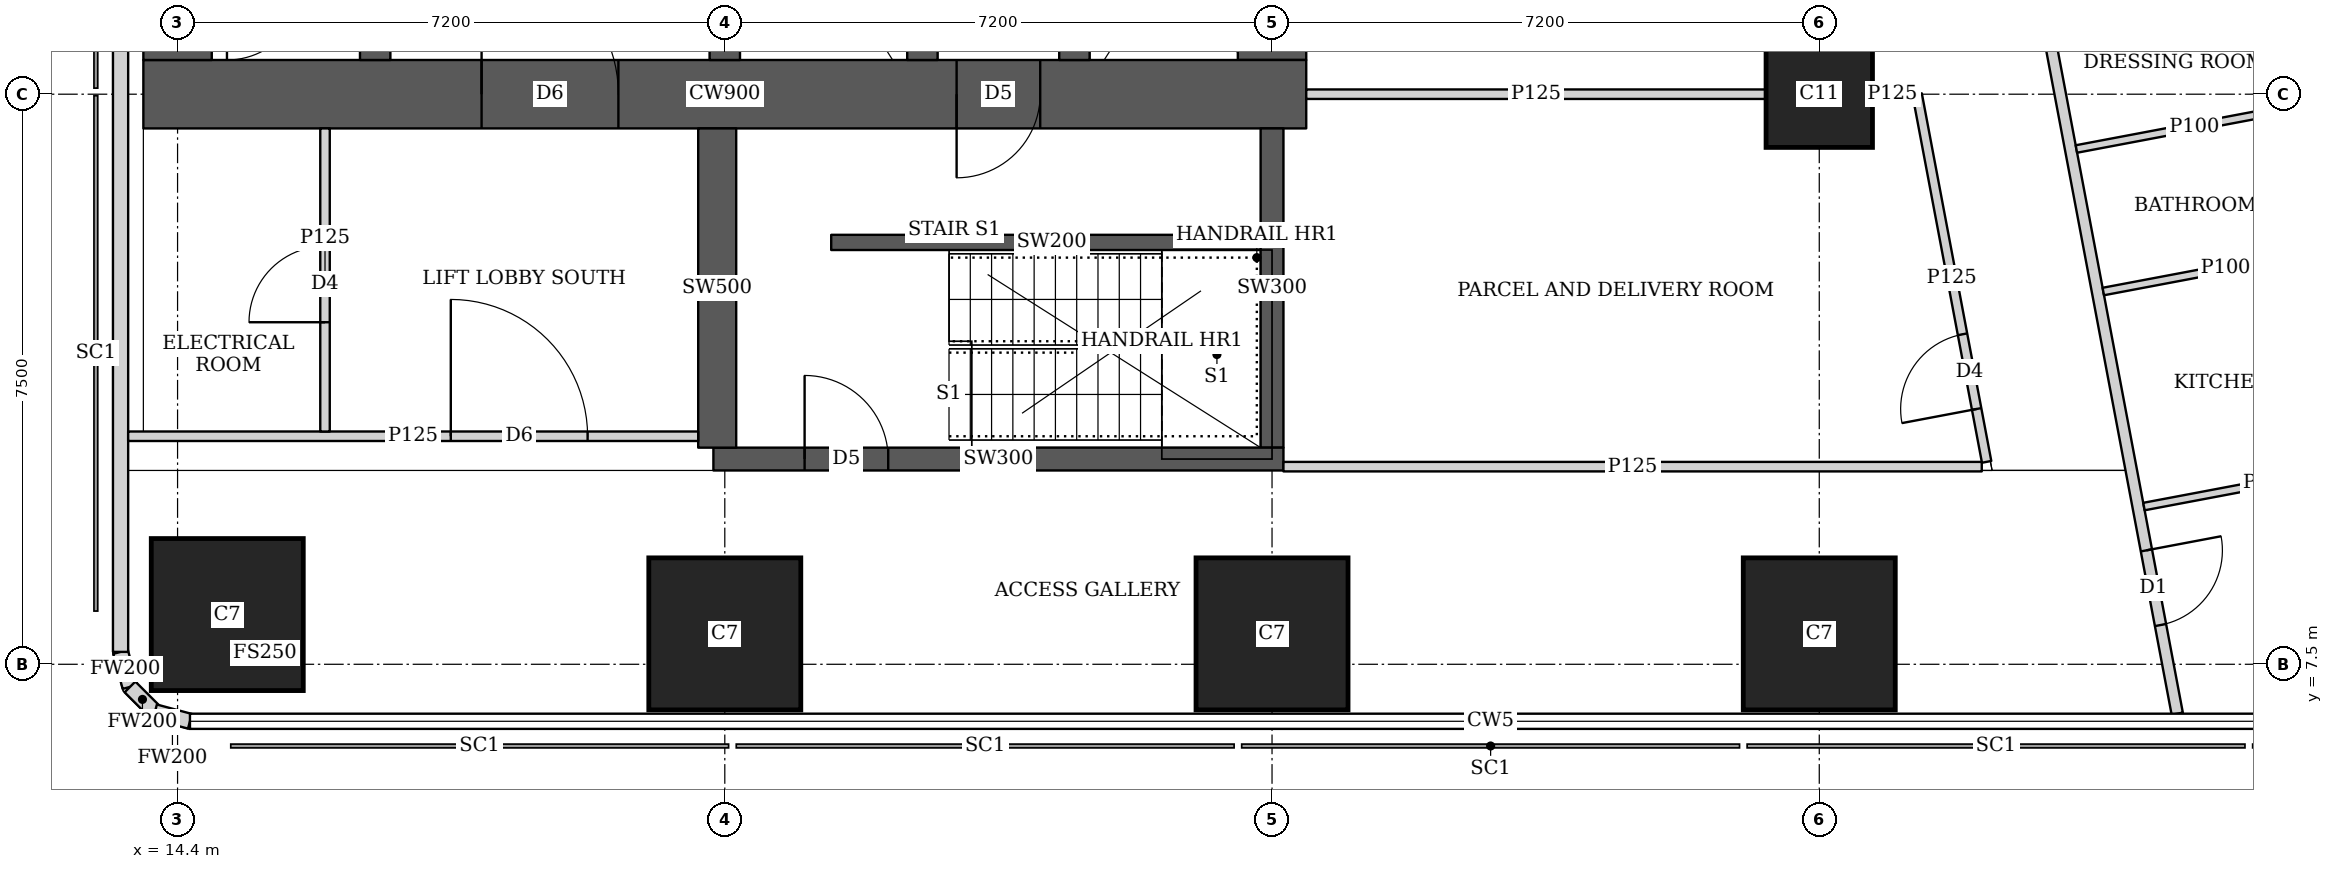
"""IFC4 building model, lengths in metres.
Left out: names, types, materials, properties, quantities, classifications, styles, units other than length and angle.
Written with IfcOpenShell. Run it as: python <this file> out.ifc"""

import sys

from ifc_helpers import new_model, si_unit, direction, frame, frame_2d, origin, origin_2d, place, context, subcontext, project, spatial, rectangle, extrude, element, fill, save


model = new_model("IFC4")
c1 = context("Model", 3, precision=1e-05, world=origin(), true_north=direction((0.0, 1.0)))
c2 = subcontext(c1, "Body", "Model", "MODEL_VIEW")
j1 = project(units=[si_unit("LENGTHUNIT", "METRE"), si_unit("PLANEANGLEUNIT", "RADIAN")], contexts=[c1])
p1 = place(None, origin())
s1 = spatial("IfcSite", under=j1, at=p1, CompositionType="ELEMENT")
p2 = place(p1, origin())
s2 = spatial("IfcBuilding", under=s1, at=p2, CompositionType="ELEMENT")
p3 = place(p2, frame((0.0, 0.0, 292.85)))
s3 = spatial("IfcBuildingStorey", under=s2, at=p3, CompositionType="ELEMENT", Elevation=292.85)
for number, where, z_axis, x_axis in (
    (1, (15.054, 8.154, 0.0), (0.0, 0.0, 1.0), (1.0, 0.0, 0.0)),
    (2, (21.6, 7.9, 0.0), (0.0, 0.0, 1.0), (1.0, 0.0, 0.0)),
    (3, (28.8, 7.9, 0.0), (0.0, 0.0, 1.0), (1.0, 0.0, 0.0)),
    (4, (36.0, 7.9, 0.0), (0.0, 0.0, 1.0), (1.0, 0.0, 0.0)),
):
    element("IfcColumn", number, at=place(p3, frame(where, z_axis=z_axis, x_axis=x_axis)), inside=s3, PredefinedType="COLUMN", context=c2, shape_type="SweptSolid", body=[
        extrude(rectangle(XDim=2.0, YDim=2.0, at=origin_2d()), origin(), (0.0, 0.0, 1.0), 3.75),
    ])
p4 = place(p3, frame((36.0, 15.0, 0.0), z_axis=(0.0, 0.0, 1.0), x_axis=(1.0, 0.0, 0.0)))
e5 = element("IfcColumn", 5, at=p4, inside=s3, PredefinedType="COLUMN", context=c2, shape_type="SweptSolid", body=[
    extrude(rectangle(XDim=1.4, YDim=1.4, at=origin_2d()), origin(), (0.0, 0.0, 1.0), 3.75),
])
p5 = place(p3, frame((13.95, 15.0, 0.0), z_axis=(0.0, 0.0, 1.0), x_axis=(1.0, 0.0, 0.0)))
e6 = element("IfcWall", 6, at=p5, inside=s3, PredefinedType="SHEAR", context=c2, shape_type="SweptSolid", body=[
    extrude(rectangle(XDim=15.3, YDim=0.9, at=frame_2d((7.65, 0.0))), origin(), (0.0, 0.0, 1.0), 3.75),
])
p6 = place(p5, frame((4.45, 0.0, 0.0)))
e7 = element("IfcOpeningElement", 7, at=p6, cuts=e6, PredefinedType="OPENING", context=c2, shape_type="SweptSolid", body=[
    extrude(rectangle(XDim=1.8, YDim=2.1, at=frame_2d((0.9, 1.05))), frame((0.0, 0.46, 0.0), z_axis=(0.0, -1.0, 0.0), x_axis=(1.0, 0.0, 0.0)), (0.0, 0.0, 1.0), 0.92),
])
p7 = place(p5, frame((10.7, 0.0, 0.0)))
e8 = element("IfcOpeningElement", 8, at=p7, cuts=e6, PredefinedType="OPENING", context=c2, shape_type="SweptSolid", body=[
    extrude(rectangle(XDim=1.1, YDim=2.1, at=frame_2d((0.55, 1.05))), frame((0.0, 0.46, 0.0), z_axis=(0.0, -1.0, 0.0), x_axis=(1.0, 0.0, 0.0)), (0.0, 0.0, 1.0), 0.92),
])
for number, where, z_axis, x_axis in (
    (9, (14.4, 15.45, 0.0), (0.0, 0.0, 1.0), (0.0, 1.0, 0.0)),
    (10, (28.8, 15.45, 0.0), (0.0, 0.0, 1.0), (0.0, 1.0, 0.0)),
):
    element("IfcWall", number, at=place(p3, frame(where, z_axis=z_axis, x_axis=x_axis)), inside=s3, PredefinedType="SHEAR", context=c2, shape_type="SweptSolid", body=[
        extrude(rectangle(XDim=14.1, YDim=0.9, at=frame_2d((7.05, 0.0))), origin(), (0.0, 0.0, 1.0), 3.75),
    ])
p8 = place(p3, frame((17.0, 15.45, 0.0), z_axis=(0.0, 0.0, 1.0), x_axis=(0.0, 1.0, 0.0)))
e11 = element("IfcWall", 11, at=p8, inside=s3, PredefinedType="SHEAR", context=c2, shape_type="SweptSolid", body=[
    extrude(rectangle(XDim=14.1, YDim=0.4, at=frame_2d((7.05, 0.0))), origin(), (0.0, 0.0, 1.0), 3.75),
])
p9 = place(p8, frame((1.05, 0.0, 0.0)))
e12 = element("IfcOpeningElement", 12, at=p9, cuts=e11, PredefinedType="OPENING", context=c2, shape_type="SweptSolid", body=[
    extrude(rectangle(XDim=1.0, YDim=2.1, at=frame_2d((0.5, 1.05))), frame((0.0, 0.21, 0.0), z_axis=(0.0, -1.0, 0.0), x_axis=(1.0, 0.0, 0.0)), (0.0, 0.0, 1.0), 0.42),
])
p10 = place(p8, frame((4.675, 0.0, 0.0)))
e13 = element("IfcOpeningElement", 13, at=p10, cuts=e11, PredefinedType="OPENING", context=c2, shape_type="SweptSolid", body=[
    extrude(rectangle(XDim=1.0, YDim=2.1, at=frame_2d((0.5, 1.05))), frame((0.0, 0.21, 0.0), z_axis=(0.0, -1.0, 0.0), x_axis=(1.0, 0.0, 0.0)), (0.0, 0.0, 1.0), 0.42),
])
p11 = place(p8, frame((8.425, 0.0, 0.0)))
e14 = element("IfcOpeningElement", 14, at=p11, cuts=e11, PredefinedType="OPENING", context=c2, shape_type="SweptSolid", body=[
    extrude(rectangle(XDim=1.0, YDim=2.1, at=frame_2d((0.5, 1.05))), frame((0.0, 0.21, 0.0), z_axis=(0.0, -1.0, 0.0), x_axis=(1.0, 0.0, 0.0)), (0.0, 0.0, 1.0), 0.42),
])
p12 = place(p8, frame((12.175, 0.0, 0.0)))
e15 = element("IfcOpeningElement", 15, at=p12, cuts=e11, PredefinedType="OPENING", context=c2, shape_type="SweptSolid", body=[
    extrude(rectangle(XDim=1.0, YDim=2.1, at=frame_2d((0.5, 1.05))), frame((0.0, 0.21, 0.0), z_axis=(0.0, -1.0, 0.0), x_axis=(1.0, 0.0, 0.0)), (0.0, 0.0, 1.0), 0.42),
])
p13 = place(p3, frame((21.6, 15.45, 0.0), z_axis=(0.0, 0.0, 1.0), x_axis=(0.0, 1.0, 0.0)))
e16 = element("IfcWall", 16, at=p13, inside=s3, PredefinedType="SHEAR", context=c2, shape_type="SweptSolid", body=[
    extrude(rectangle(XDim=14.1, YDim=0.4, at=frame_2d((7.05, 0.0))), origin(), (0.0, 0.0, 1.0), 3.75),
])
p14 = place(p13, frame((0.875, 0.0, 0.0)))
e17 = element("IfcOpeningElement", 17, at=p14, cuts=e16, PredefinedType="OPENING", context=c2, shape_type="SweptSolid", body=[
    extrude(rectangle(XDim=1.1, YDim=2.1, at=frame_2d((0.55, 1.05))), frame((0.0, 0.21, 0.0), z_axis=(0.0, -1.0, 0.0), x_axis=(1.0, 0.0, 0.0)), (0.0, 0.0, 1.0), 0.42),
])
p15 = place(p13, frame((4.625, 0.0, 0.0)))
e18 = element("IfcOpeningElement", 18, at=p15, cuts=e16, PredefinedType="OPENING", context=c2, shape_type="SweptSolid", body=[
    extrude(rectangle(XDim=1.1, YDim=2.1, at=frame_2d((0.55, 1.05))), frame((0.0, 0.21, 0.0), z_axis=(0.0, -1.0, 0.0), x_axis=(1.0, 0.0, 0.0)), (0.0, 0.0, 1.0), 0.42),
])
p16 = place(p13, frame((8.375, 0.0, 0.0)))
e19 = element("IfcOpeningElement", 19, at=p16, cuts=e16, PredefinedType="OPENING", context=c2, shape_type="SweptSolid", body=[
    extrude(rectangle(XDim=1.1, YDim=2.1, at=frame_2d((0.55, 1.05))), frame((0.0, 0.21, 0.0), z_axis=(0.0, -1.0, 0.0), x_axis=(1.0, 0.0, 0.0)), (0.0, 0.0, 1.0), 0.42),
])
p17 = place(p13, frame((12.125, 0.0, 0.0)))
e20 = element("IfcOpeningElement", 20, at=p17, cuts=e16, PredefinedType="OPENING", context=c2, shape_type="SweptSolid", body=[
    extrude(rectangle(XDim=1.1, YDim=2.1, at=frame_2d((0.55, 1.05))), frame((0.0, 0.21, 0.0), z_axis=(0.0, -1.0, 0.0), x_axis=(1.0, 0.0, 0.0)), (0.0, 0.0, 1.0), 0.42),
])
p18 = place(p3, frame((24.2, 15.45, 0.0), z_axis=(0.0, 0.0, 1.0), x_axis=(0.0, 1.0, 0.0)))
e21 = element("IfcWall", 21, at=p18, inside=s3, PredefinedType="SHEAR", context=c2, shape_type="SweptSolid", body=[
    extrude(rectangle(XDim=14.1, YDim=0.4, at=frame_2d((7.05, 0.0))), origin(), (0.0, 0.0, 1.0), 3.75),
])
p19 = place(p3, frame((26.2, 15.45, 0.0), z_axis=(0.0, 0.0, 1.0), x_axis=(0.0, 1.0, 0.0)))
e22 = element("IfcWall", 22, at=p19, inside=s3, PredefinedType="SHEAR", context=c2, shape_type="SweptSolid", body=[
    extrude(rectangle(XDim=3.1, YDim=0.4, at=frame_2d((1.55, 0.0))), origin(), (0.0, 0.0, 1.0), 3.75),
])
p20 = place(p19, frame((0.825, 0.0, 0.0)))
e23 = element("IfcOpeningElement", 23, at=p20, cuts=e22, PredefinedType="OPENING", context=c2, shape_type="SweptSolid", body=[
    extrude(rectangle(XDim=1.2, YDim=2.1, at=frame_2d((0.6, 1.05))), frame((0.0, 0.21, 0.0), z_axis=(0.0, -1.0, 0.0), x_axis=(1.0, 0.0, 0.0)), (0.0, 0.0, 1.0), 0.42),
])
p21 = place(p3, frame((21.45, 10.2, 0.0), z_axis=(0.0, 0.0, 1.0), x_axis=(1.0, 0.0, 0.0)))
e24 = element("IfcWall", 24, at=p21, inside=s3, PredefinedType="SHEAR", context=c2, shape_type="SweptSolid", body=[
    extrude(rectangle(XDim=7.5, YDim=0.3, at=frame_2d((3.75, 0.0))), origin(), (0.0, 0.0, 1.0), 3.75),
])
p22 = place(p21, frame((1.2, 0.0, 0.0)))
e25 = element("IfcOpeningElement", 25, at=p22, cuts=e24, PredefinedType="OPENING", context=c2, shape_type="SweptSolid", body=[
    extrude(rectangle(XDim=1.1, YDim=2.1, at=frame_2d((0.55, 1.05))), frame((0.0, 0.16, 0.0), z_axis=(0.0, -1.0, 0.0), x_axis=(1.0, 0.0, 0.0)), (0.0, 0.0, 1.0), 0.32),
])
p23 = place(p3, frame((21.5, 10.35, 0.0), z_axis=(0.0, 0.0, 1.0), x_axis=(0.0, 1.0, 0.0)))
e26 = element("IfcWall", 26, at=p23, inside=s3, PredefinedType="SHEAR", context=c2, shape_type="SweptSolid", body=[
    extrude(rectangle(XDim=4.2, YDim=0.5, at=frame_2d((2.1, 0.0))), origin(), (0.0, 0.0, 1.0), 3.75),
])
p24 = place(p3, frame((28.8, 10.35, 0.0), z_axis=(0.0, 0.0, 1.0), x_axis=(0.0, 1.0, 0.0)))
e27 = element("IfcWall", 27, at=p24, inside=s3, PredefinedType="SHEAR", context=c2, shape_type="SweptSolid", body=[
    extrude(rectangle(XDim=4.2, YDim=0.3, at=frame_2d((2.1, 0.0))), origin(), (0.0, 0.0, 1.0), 3.75),
])
p25 = place(p3, frame((13.65, 43.037, 0.0), z_axis=(0.0, 0.0, 1.0), x_axis=(0.0, -1.0, 0.0)))
e28 = element("IfcWall", 28, at=p25, inside=s3, PredefinedType="SOLIDWALL", context=c2, shape_type="SweptSolid", body=[
    extrude(rectangle(XDim=35.374, YDim=0.2, at=frame_2d((17.687, 0.0))), origin(), (0.0, 0.0, 1.0), 3.4),
])
p26 = place(p3, frame((13.65, 7.663, 0.0), z_axis=(0.0, 0.0, 1.0), x_axis=(0.259698463175, -0.965689757751, 0.0)))
e29 = element("IfcWall", 29, at=p26, inside=s3, PredefinedType="SOLIDWALL", context=c2, shape_type="SweptSolid", body=[
    extrude(rectangle(XDim=0.478, YDim=0.2, at=frame_2d((0.239, 0.0))), origin(), (0.0, 0.0, 1.0), 3.4),
])
p27 = place(p3, frame((13.774, 7.202, 0.0), z_axis=(0.0, 0.0, 1.0), x_axis=(0.707369890659, -0.706843573776, 0.0)))
e30 = element("IfcWall", 30, at=p27, inside=s3, PredefinedType="SOLIDWALL", context=c2, shape_type="SweptSolid", body=[
    extrude(rectangle(XDim=0.464, YDim=0.2, at=frame_2d((0.232, 0.0))), origin(), (0.0, 0.0, 1.0), 3.4),
])
p28 = place(p3, frame((14.102, 6.874, 0.0), z_axis=(0.0, 0.0, 1.0), x_axis=(0.965655254015, -0.259826731483, 0.0)))
e31 = element("IfcWall", 31, at=p28, inside=s3, PredefinedType="SOLIDWALL", context=c2, shape_type="SweptSolid", body=[
    extrude(rectangle(XDim=0.477, YDim=0.2, at=frame_2d((0.239, 0.0))), origin(), (0.0, 0.0, 1.0), 3.4),
])
p29 = place(p3, frame((34.036, 42.186, 0.0), z_axis=(0.0, 0.0, 1.0), x_axis=(0.185593518645, -0.9826266055, 0.0)))
e32 = element("IfcWall", 32, at=p29, inside=s3, PredefinedType="SOLIDWALL", context=c2, shape_type="SweptSolid", body=[
    extrude(rectangle(XDim=35.961, YDim=0.15, at=frame_2d((17.98, 0.0))), origin(), (0.0, 0.0, 1.0), 2.4),
])
p30 = place(p29, frame((19.345, 0.0, 0.0)))
e33 = element("IfcOpeningElement", 33, at=p30, cuts=e32, PredefinedType="OPENING", context=c2, shape_type="SweptSolid", body=[
    extrude(rectangle(XDim=1.0, YDim=2.1, at=frame_2d((0.5, 1.05))), frame((0.0, 0.085, 0.0), z_axis=(0.0, -1.0, 0.0), x_axis=(1.0, 0.0, 0.0)), (0.0, 0.0, 1.0), 0.17),
])
p31 = place(p29, frame((33.774, 0.0, 0.0)))
e34 = element("IfcOpeningElement", 34, at=p31, cuts=e32, PredefinedType="OPENING", context=c2, shape_type="SweptSolid", body=[
    extrude(rectangle(XDim=1.0, YDim=2.1, at=frame_2d((0.5, 1.05))), frame((0.0, 0.085, 0.0), z_axis=(0.0, -1.0, 0.0), x_axis=(1.0, 0.0, 0.0)), (0.0, 0.0, 1.0), 0.17),
])
p32 = place(p3, frame((42.49, 14.866, 0.0), z_axis=(0.0, 0.0, 1.0), x_axis=(-0.982621285075, -0.185621685472, 0.0)))
e35 = element("IfcWall", 35, at=p32, inside=s3, PredefinedType="PARTITIONING", context=c2, shape_type="SweptSolid", body=[
    extrude(rectangle(XDim=3.162, YDim=0.1, at=frame_2d((1.581, 0.0))), origin(), (0.0, 0.0, 1.0), 2.5),
])
p33 = place(p3, frame((42.956, 13.012, 0.0), z_axis=(0.0, 0.0, 1.0), x_axis=(-0.982630897129, -0.185570795135, 0.0)))
e36 = element("IfcWall", 36, at=p33, inside=s3, PredefinedType="PARTITIONING", context=c2, shape_type="SweptSolid", body=[
    extrude(rectangle(XDim=3.276, YDim=0.1, at=frame_2d((1.638, 0.0))), origin(), (0.0, 0.0, 1.0), 2.5),
])
p34 = place(p3, frame((43.539, 10.192, 0.0), z_axis=(0.0, 0.0, 1.0), x_axis=(-0.982633623707, -0.185556356831, 0.0)))
e37 = element("IfcWall", 37, at=p34, inside=s3, PredefinedType="PARTITIONING", context=c2, shape_type="SweptSolid", body=[
    extrude(rectangle(XDim=3.325, YDim=0.1, at=frame_2d((1.663, 0.0))), origin(), (0.0, 0.0, 1.0), 2.5),
])
p35 = place(p3, frame((13.75, 10.5, 0.0), z_axis=(0.0, 0.0, 1.0), x_axis=(1.0, 0.0, 0.0)))
e38 = element("IfcWall", 38, at=p35, inside=s3, PredefinedType="PARTITIONING", context=c2, shape_type="SweptSolid", body=[
    extrude(rectangle(XDim=7.5, YDim=0.125, at=frame_2d((3.75, 0.0))), origin(), (0.0, 0.0, 1.0), 3.4),
])
p36 = place(p35, frame((4.245, 0.0, 0.0)))
e39 = element("IfcOpeningElement", 39, at=p36, cuts=e38, PredefinedType="OPENING", context=c2, shape_type="SweptSolid", body=[
    extrude(rectangle(XDim=1.8, YDim=2.1, at=frame_2d((0.9, 1.05))), frame((0.0, 0.073, 0.0), z_axis=(0.0, -1.0, 0.0), x_axis=(1.0, 0.0, 0.0)), (0.0, 0.0, 1.0), 0.145),
])
p37 = place(p3, frame((16.34, 10.562, 0.0), z_axis=(0.0, 0.0, 1.0), x_axis=(0.0, 1.0, 0.0)))
e40 = element("IfcWall", 40, at=p37, inside=s3, PredefinedType="PARTITIONING", context=c2, shape_type="SweptSolid", body=[
    extrude(rectangle(XDim=3.988, YDim=0.125, at=frame_2d((1.994, 0.0))), origin(), (0.0, 0.0, 1.0), 3.4),
])
p38 = place(p37, frame((1.438, 0.0, 0.0)))
e41 = element("IfcOpeningElement", 41, at=p38, cuts=e40, PredefinedType="OPENING", context=c2, shape_type="SweptSolid", body=[
    extrude(rectangle(XDim=1.0, YDim=2.1, at=frame_2d((0.5, 1.05))), frame((0.0, 0.073, 0.0), z_axis=(0.0, -1.0, 0.0), x_axis=(1.0, 0.0, 0.0)), (0.0, 0.0, 1.0), 0.145),
])
p39 = place(p3, frame((28.95, 10.1, 0.0), z_axis=(0.0, 0.0, 1.0), x_axis=(1.0, 0.0, 0.0)))
e42 = element("IfcWall", 42, at=p39, inside=s3, PredefinedType="PARTITIONING", context=c2, shape_type="SweptSolid", body=[
    extrude(rectangle(XDim=9.188, YDim=0.125, at=frame_2d((4.594, 0.0))), origin(), (0.0, 0.0, 1.0), 2.5),
])
p40 = place(p3, frame((38.202, 10.163, 0.0), z_axis=(0.0, 0.0, 1.0), x_axis=(-0.185641892853, 0.982617467593, 0.0)))
e43 = element("IfcWall", 43, at=p40, inside=s3, PredefinedType="PARTITIONING", context=c2, shape_type="SweptSolid", body=[
    extrude(rectangle(XDim=4.922, YDim=0.125, at=frame_2d((2.461, 0.0))), origin(), (0.0, 0.0, 1.0), 2.5),
])
p41 = place(p40, frame((0.708, 0.0, 0.0)))
e44 = element("IfcOpeningElement", 44, at=p41, cuts=e43, PredefinedType="OPENING", context=c2, shape_type="SweptSolid", body=[
    extrude(rectangle(XDim=1.0, YDim=2.1, at=frame_2d((0.5, 1.05))), frame((0.0, 0.073, 0.0), z_axis=(0.0, -1.0, 0.0), x_axis=(1.0, 0.0, 0.0)), (0.0, 0.0, 1.0), 0.145),
])
p42 = place(p3, frame((29.25, 15.0, 0.0), z_axis=(0.0, 0.0, 1.0), x_axis=(1.0, 0.0, 0.0)))
e45 = element("IfcWall", 45, at=p42, inside=s3, PredefinedType="PARTITIONING", context=c2, shape_type="SweptSolid", body=[
    extrude(rectangle(XDim=6.049, YDim=0.125, at=frame_2d((3.024, 0.0))), origin(), (0.0, 0.0, 1.0), 2.5),
])
p43 = place(p3, frame((36.701, 15.0, 0.0), z_axis=(0.0, 0.0, 1.0), x_axis=(1.0, 0.0, 0.0)))
e46 = element("IfcWall", 46, at=p43, inside=s3, PredefinedType="PARTITIONING", context=c2, shape_type="SweptSolid", body=[
    extrude(rectangle(XDim=0.526, YDim=0.125, at=frame_2d((0.263, 0.0))), origin(), (0.0, 0.0, 1.0), 2.5),
])
p44 = place(p3, frame((23.0, 13.05, 0.0), z_axis=(0.0, 0.0, 1.0), x_axis=(1.0, 0.0, 0.0)))
e47 = element("IfcWall", 47, at=p44, inside=s3, PredefinedType="SHEAR", context=c2, shape_type="SweptSolid", body=[
    extrude(rectangle(XDim=5.8, YDim=0.2, at=frame_2d((2.9, 0.0))), origin(), (0.0, 0.0, 1.0), 3.75),
])
p45 = place(p31, origin())
e48 = element("IfcDoor", 48, at=p45, inside=s3, OperationType="SINGLE_SWING_LEFT", PredefinedType="DOOR", context=c2, shape_type="SweptSolid", body=[
    extrude(rectangle(XDim=1.0, YDim=2.1, at=frame_2d((0.5, 1.05))), frame((0.0, 0.025, 0.0), z_axis=(0.0, -1.0, 0.0), x_axis=(1.0, 0.0, 0.0)), (0.0, 0.0, 1.0), 0.05),
])
fill(e34, e48)
p46 = place(p38, origin())
e49 = element("IfcDoor", 49, at=p46, inside=s3, OperationType="SINGLE_SWING_LEFT", PredefinedType="DOOR", context=c2, shape_type="SweptSolid", body=[
    extrude(rectangle(XDim=1.0, YDim=2.1, at=frame_2d((0.5, 1.05))), frame((0.0, 0.025, 0.0), z_axis=(0.0, -1.0, 0.0), x_axis=(1.0, 0.0, 0.0)), (0.0, 0.0, 1.0), 0.05),
])
fill(e41, e49)
p47 = place(p36, origin())
e50 = element("IfcDoor", 50, at=p47, inside=s3, OperationType="DOUBLE_DOOR_SINGLE_SWING", PredefinedType="DOOR", context=c2, shape_type="SweptSolid", body=[
    extrude(rectangle(XDim=1.8, YDim=2.1, at=frame_2d((0.9, 1.05))), frame((0.0, 0.025, 0.0), z_axis=(0.0, -1.0, 0.0), x_axis=(1.0, 0.0, 0.0)), (0.0, 0.0, 1.0), 0.05),
])
fill(e39, e50)
p48 = place(p41, origin())
e51 = element("IfcDoor", 51, at=p48, inside=s3, OperationType="SINGLE_SWING_LEFT", PredefinedType="DOOR", context=c2, shape_type="SweptSolid", body=[
    extrude(rectangle(XDim=1.0, YDim=2.1, at=frame_2d((0.5, 1.05))), frame((0.0, 0.025, 0.0), z_axis=(0.0, -1.0, 0.0), x_axis=(1.0, 0.0, 0.0)), (0.0, 0.0, 1.0), 0.05),
])
fill(e44, e51)
p49 = place(p6, origin())
e52 = element("IfcDoor", 52, at=p49, inside=s3, OperationType="DOUBLE_DOOR_SINGLE_SWING", PredefinedType="DOOR", context=c2, shape_type="SweptSolid", body=[
    extrude(rectangle(XDim=1.8, YDim=2.1, at=frame_2d((0.9, 1.05))), frame((0.0, 0.025, 0.0), z_axis=(0.0, -1.0, 0.0), x_axis=(1.0, 0.0, 0.0)), (0.0, 0.0, 1.0), 0.05),
])
fill(e7, e52)
p50 = place(p7, origin())
e53 = element("IfcDoor", 53, at=p50, inside=s3, OperationType="SINGLE_SWING_RIGHT", PredefinedType="DOOR", context=c2, shape_type="SweptSolid", body=[
    extrude(rectangle(XDim=1.1, YDim=2.1, at=frame_2d((0.55, 1.05))), frame((0.0, 0.025, 0.0), z_axis=(0.0, -1.0, 0.0), x_axis=(1.0, 0.0, 0.0)), (0.0, 0.0, 1.0), 0.05),
])
fill(e8, e53)
p51 = place(p22, origin())
e54 = element("IfcDoor", 54, at=p51, inside=s3, OperationType="SINGLE_SWING_LEFT", PredefinedType="DOOR", context=c2, shape_type="SweptSolid", body=[
    extrude(rectangle(XDim=1.1, YDim=2.1, at=frame_2d((0.55, 1.05))), frame((0.0, 0.025, 0.0), z_axis=(0.0, -1.0, 0.0), x_axis=(1.0, 0.0, 0.0)), (0.0, 0.0, 1.0), 0.05),
])
fill(e25, e54)
save(model, sys.argv[1])
